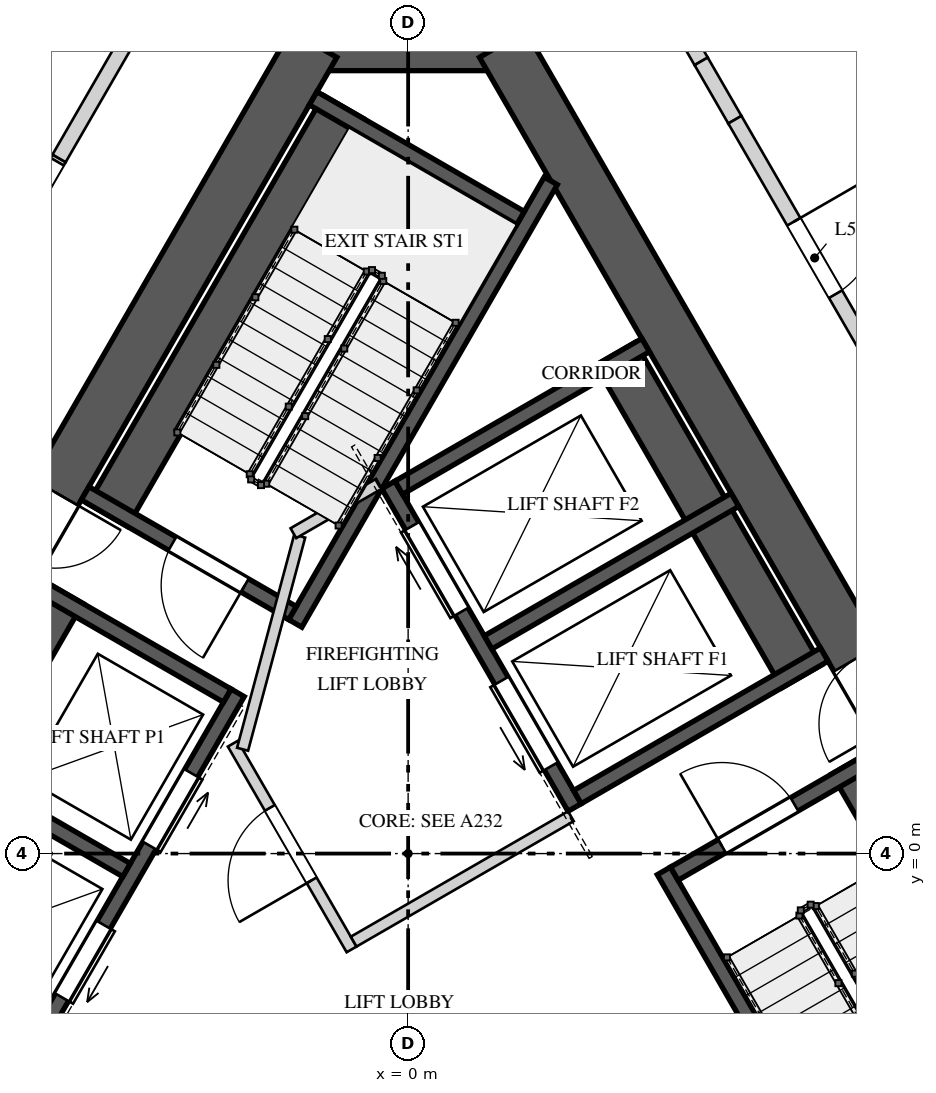
"""IFC4 building model, lengths in metres.
Left out: names, types, materials, properties, quantities, classifications, styles, units other than length and angle.
Written with IfcOpenShell. Run it as: python <this file> out.ifc"""

import sys

from ifc_helpers import new_model, si_unit, direction, frame, frame_2d, origin, place, context, subcontext, project, spatial, polyline, rectangle, outline, extrude, element, fill, save


model = new_model("IFC4")
c1 = context("Model", 3, precision=1e-05, world=origin(), true_north=direction((0.0, 1.0)))
c2 = subcontext(c1, "Body", "Model", "MODEL_VIEW")
j1 = project(units=[si_unit("LENGTHUNIT", "METRE"), si_unit("PLANEANGLEUNIT", "RADIAN")], contexts=[c1])
p1 = place(None, origin())
s1 = spatial("IfcSite", under=j1, at=p1, CompositionType="ELEMENT")
p2 = place(p1, origin())
s2 = spatial("IfcBuilding", under=s1, at=p2, CompositionType="ELEMENT")
p3 = place(p2, frame((0.0, 0.0, 237.2)))
s3 = spatial("IfcBuildingStorey", under=s2, at=p3, CompositionType="ELEMENT", Elevation=237.2)
p4 = place(p3, frame((1.443, 10.65, 0.0), z_axis=(0.0, 0.0, 1.0), x_axis=(-1.0, 0.0, 0.0)))
e1 = element("IfcWall", 1, at=p4, inside=s3, PredefinedType="SHEAR", context=c2, shape_type="SweptSolid", body=[
    extrude(rectangle(XDim=2.887, YDim=0.7, at=frame_2d((1.443, 0.0))), origin(), (0.0, 0.0, 1.0), 4.0),
])
p5 = place(p3, frame((-1.241, 10.65, 0.0), z_axis=(0.0, 0.0, 1.0), x_axis=(-0.500003331888, -0.866023480109, 0.0)))
e2 = element("IfcWall", 2, at=p5, inside=s3, PredefinedType="SHEAR", context=c2, shape_type="SweptSolid", body=[
    extrude(rectangle(XDim=17.205, YDim=0.7, at=frame_2d((8.603, 0.0))), origin(), (0.0, 0.0, 1.0), 4.0),
])
p6 = place(p5, frame((6.808, 0.0, 0.0)))
e3 = element("IfcOpeningElement", 3, at=p6, cuts=e2, PredefinedType="OPENING", context=c2, shape_type="SweptSolid", body=[
    extrude(rectangle(XDim=1.0, YDim=2.4, at=frame_2d((0.5, 1.2))), frame((0.0, 0.36, 0.0), z_axis=(0.0, -1.0, 0.0), x_axis=(1.0, 0.0, 0.0)), (0.0, 0.0, 1.0), 0.72),
])
p7 = place(p5, frame((14.922, 0.0, 0.0)))
e4 = element("IfcOpeningElement", 4, at=p7, cuts=e2, PredefinedType="OPENING", context=c2, shape_type="SweptSolid", body=[
    extrude(rectangle(XDim=0.8, YDim=2.1, at=frame_2d((0.4, 1.05))), frame((0.0, 0.36, 0.0), z_axis=(0.0, -1.0, 0.0), x_axis=(1.0, 0.0, 0.0)), (0.0, 0.0, 1.0), 0.72),
])
p8 = place(p3, frame((9.844, -4.25, 0.0), z_axis=(0.0, 0.0, 1.0), x_axis=(-0.500003331888, 0.866023480109, 0.0)))
e5 = element("IfcWall", 5, at=p8, inside=s3, PredefinedType="SHEAR", context=c2, shape_type="SweptSolid", body=[
    extrude(rectangle(XDim=17.205, YDim=0.7, at=frame_2d((8.603, 0.0))), origin(), (0.0, 0.0, 1.0), 4.0),
])
p9 = place(p8, frame((6.877, 0.0, 0.0)))
e6 = element("IfcOpeningElement", 6, at=p9, cuts=e5, PredefinedType="OPENING", context=c2, shape_type="SweptSolid", body=[
    extrude(rectangle(XDim=1.0, YDim=2.4, at=frame_2d((0.5, 1.2))), frame((0.0, 0.36, 0.0), z_axis=(0.0, -1.0, 0.0), x_axis=(1.0, 0.0, 0.0)), (0.0, 0.0, 1.0), 0.72),
])
p10 = place(p3, frame((-0.853, 9.823, 0.0), z_axis=(0.0, 0.0, 1.0), x_axis=(-0.500009909098, -0.866019682689, 0.0)))
e7 = element("IfcWall", 7, at=p10, inside=s3, PredefinedType="SOLIDWALL", context=c2, shape_type="SweptSolid", body=[
    extrude(rectangle(XDim=6.2, YDim=0.6, at=frame_2d((3.1, 0.0))), origin(), (0.0, 0.0, 1.0), 3.65),
])
p11 = place(p3, frame((1.876, 8.85, 0.0), z_axis=(0.0, 0.0, 1.0), x_axis=(-0.499998042495, -0.866026533947, 0.0)))
e8 = element("IfcWall", 8, at=p11, inside=s3, PredefinedType="SOLIDWALL", context=c2, shape_type="SweptSolid", body=[
    extrude(rectangle(XDim=6.723, YDim=0.2, at=frame_2d((3.361, 0.0))), origin(), (0.0, 0.0, 1.0), 3.65),
])
p12 = place(p3, frame((1.479, 8.361, 0.0), z_axis=(0.0, 0.0, 1.0), x_axis=(-0.866035871367, 0.499981869177, 0.0)))
e9 = element("IfcWall", 9, at=p12, inside=s3, PredefinedType="SOLIDWALL", context=c2, shape_type="SweptSolid", body=[
    extrude(rectangle(XDim=3.15, YDim=0.2, at=frame_2d((1.575, 0.0))), origin(), (0.0, 0.0, 1.0), 3.65),
])
p13 = place(p3, frame((-1.521, 3.165, 0.0), z_axis=(0.0, 0.0, 1.0), x_axis=(-0.866035871367, 0.499981869177, 0.0)))
e10 = element("IfcWall", 10, at=p13, inside=s3, PredefinedType="SOLIDWALL", context=c2, shape_type="SweptSolid", body=[
    extrude(rectangle(XDim=3.15, YDim=0.2, at=frame_2d((1.575, 0.0))), origin(), (0.0, 0.0, 1.0), 3.65),
])
p14 = place(p13, frame((0.725, 0.0, 0.0)))
e11 = element("IfcOpeningElement", 11, at=p14, cuts=e10, PredefinedType="OPENING", context=c2, shape_type="SweptSolid", body=[
    extrude(rectangle(XDim=1.1, YDim=2.4, at=frame_2d((0.55, 1.2))), frame((0.0, 0.11, 0.0), z_axis=(0.0, -1.0, 0.0), x_axis=(1.0, 0.0, 0.0)), (0.0, 0.0, 1.0), 0.22),
])
p15 = place(p3, frame((8.933, -4.172, 0.0), z_axis=(0.0, 0.0, 1.0), x_axis=(-0.500026960575, 0.86600983753, 0.0)))
e12 = element("IfcWall", 12, at=p15, inside=s3, PredefinedType="SOLIDWALL", context=c2, shape_type="SweptSolid", body=[
    extrude(rectangle(XDim=6.2, YDim=0.6, at=frame_2d((3.1, 0.0))), origin(), (0.0, 0.0, 1.0), 3.65),
])
p16 = place(p3, frame((6.726, -6.05, 0.0), z_axis=(0.0, 0.0, 1.0), x_axis=(-0.499970804718, 0.866042259032, 0.0)))
e13 = element("IfcWall", 13, at=p16, inside=s3, PredefinedType="SOLIDWALL", context=c2, shape_type="SweptSolid", body=[
    extrude(rectangle(XDim=6.723, YDim=0.2, at=frame_2d((3.361, 0.0))), origin(), (0.0, 0.0, 1.0), 3.65),
])
p17 = place(p3, frame((3.501, -0.265, 0.0), z_axis=(0.0, 0.0, 1.0), x_axis=(0.866035871367, 0.499981869177, 0.0)))
e14 = element("IfcWall", 14, at=p17, inside=s3, PredefinedType="SOLIDWALL", context=c2, shape_type="SweptSolid", body=[
    extrude(rectangle(XDim=3.15, YDim=0.2, at=frame_2d((1.575, 0.0))), origin(), (0.0, 0.0, 1.0), 3.65),
])
p18 = place(p17, frame((0.725, 0.0, 0.0)))
e15 = element("IfcOpeningElement", 15, at=p18, cuts=e14, PredefinedType="OPENING", context=c2, shape_type="SweptSolid", body=[
    extrude(rectangle(XDim=1.1, YDim=2.4, at=frame_2d((0.55, 1.2))), frame((0.0, 0.11, 0.0), z_axis=(0.0, -1.0, 0.0), x_axis=(1.0, 0.0, 0.0)), (0.0, 0.0, 1.0), 0.22),
])
p19 = place(p3, frame((-2.243, 2.115, 0.0), z_axis=(0.0, 0.0, 1.0), x_axis=(-0.499996545922, -0.866027397988, 0.0)))
e16 = element("IfcWall", 16, at=p19, inside=s3, PredefinedType="SOLIDWALL", context=c2, shape_type="SweptSolid", body=[
    extrude(rectangle(XDim=5.5, YDim=0.2, at=frame_2d((2.75, 0.0))), origin(), (0.0, 0.0, 1.0), 3.65),
])
p20 = place(p19, frame((1.22, 0.0, 0.0)))
e17 = element("IfcOpeningElement", 17, at=p20, cuts=e16, PredefinedType="OPENING", context=c2, shape_type="SweptSolid", body=[
    extrude(rectangle(XDim=1.1, YDim=2.1, at=frame_2d((0.55, 1.05))), frame((0.0, 0.11, 0.0), z_axis=(0.0, -1.0, 0.0), x_axis=(1.0, 0.0, 0.0)), (0.0, 0.0, 1.0), 0.22),
])
p21 = place(p19, frame((3.525, 0.0, 0.0)))
e18 = element("IfcOpeningElement", 18, at=p21, cuts=e16, PredefinedType="OPENING", context=c2, shape_type="SweptSolid", body=[
    extrude(rectangle(XDim=1.1, YDim=2.1, at=frame_2d((0.55, 1.05))), frame((0.0, 0.11, 0.0), z_axis=(0.0, -1.0, 0.0), x_axis=(1.0, 0.0, 0.0)), (0.0, 0.0, 1.0), 0.22),
])
p22 = place(p3, frame((-4.538, 3.44, 0.0), z_axis=(0.0, 0.0, 1.0), x_axis=(-0.499996545922, -0.866027397988, 0.0)))
e19 = element("IfcWall", 19, at=p22, inside=s3, PredefinedType="SOLIDWALL", context=c2, shape_type="SweptSolid", body=[
    extrude(rectangle(XDim=5.5, YDim=0.6, at=frame_2d((2.75, 0.0))), origin(), (0.0, 0.0, 1.0), 3.65),
])
p23 = place(p3, frame((-2.38, 2.078, 0.0), z_axis=(0.0, 0.0, 1.0), x_axis=(-0.866060182126, 0.499939757307, 0.0)))
e20 = element("IfcWall", 20, at=p23, inside=s3, PredefinedType="SOLIDWALL", context=c2, shape_type="SweptSolid", body=[
    extrude(rectangle(XDim=2.95, YDim=0.2, at=frame_2d((1.475, 0.0))), origin(), (0.0, 0.0, 1.0), 3.65),
])
p24 = place(p3, frame((-3.705, -0.217, 0.0), z_axis=(0.0, 0.0, 1.0), x_axis=(-0.866016039709, 0.500016218704, 0.0)))
e21 = element("IfcWall", 21, at=p24, inside=s3, PredefinedType="SOLIDWALL", context=c2, shape_type="SweptSolid", body=[
    extrude(rectangle(XDim=2.35, YDim=0.2, at=frame_2d((1.175, 0.0))), origin(), (0.0, 0.0, 1.0), 3.65),
])
p25 = place(p3, frame((2.19, 0.606, 0.0), z_axis=(0.0, 0.0, 1.0), x_axis=(-0.500002801628, 0.866023786258, 0.0)))
e22 = element("IfcWall", 22, at=p25, inside=s3, PredefinedType="SOLIDWALL", context=c2, shape_type="SweptSolid", body=[
    extrude(rectangle(XDim=4.9, YDim=0.2, at=frame_2d((2.45, 0.0))), origin(), (0.0, 0.0, 1.0), 3.65),
])
p26 = place(p25, frame((0.625, 0.0, 0.0)))
e23 = element("IfcOpeningElement", 23, at=p26, cuts=e22, PredefinedType="OPENING", context=c2, shape_type="SweptSolid", body=[
    extrude(rectangle(XDim=1.3, YDim=2.1, at=frame_2d((0.65, 1.05))), frame((0.0, 0.11, 0.0), z_axis=(0.0, -1.0, 0.0), x_axis=(1.0, 0.0, 0.0)), (0.0, 0.0, 1.0), 0.22),
])
p27 = place(p25, frame((2.975, 0.0, 0.0)))
e24 = element("IfcOpeningElement", 24, at=p27, cuts=e22, PredefinedType="OPENING", context=c2, shape_type="SweptSolid", body=[
    extrude(rectangle(XDim=1.3, YDim=2.1, at=frame_2d((0.65, 1.05))), frame((0.0, 0.11, 0.0), z_axis=(0.0, -1.0, 0.0), x_axis=(1.0, 0.0, 0.0)), (0.0, 0.0, 1.0), 0.22),
])
p28 = place(p3, frame((5.178, 2.331, 0.0), z_axis=(0.0, 0.0, 1.0), x_axis=(-0.49998122708, 0.866036242063, 0.0)))
e25 = element("IfcWall", 25, at=p28, inside=s3, PredefinedType="SOLIDWALL", context=c2, shape_type="SweptSolid", body=[
    extrude(rectangle(XDim=4.9, YDim=0.6, at=frame_2d((2.45, 0.0))), origin(), (0.0, 0.0, 1.0), 3.65),
])
p29 = place(p3, frame((2.227, 0.743, 0.0), z_axis=(0.0, 0.0, 1.0), x_axis=(0.866022959057, 0.500004234368, 0.0)))
e26 = element("IfcWall", 26, at=p29, inside=s3, PredefinedType="SOLIDWALL", context=c2, shape_type="SweptSolid", body=[
    extrude(rectangle(XDim=3.75, YDim=0.2, at=frame_2d((1.875, 0.0))), origin(), (0.0, 0.0, 1.0), 3.65),
])
p30 = place(p3, frame((1.052, 2.778, 0.0), z_axis=(0.0, 0.0, 1.0), x_axis=(0.866039234136, 0.499976044363, 0.0)))
e27 = element("IfcWall", 27, at=p30, inside=s3, PredefinedType="SOLIDWALL", context=c2, shape_type="SweptSolid", body=[
    extrude(rectangle(XDim=3.75, YDim=0.2, at=frame_2d((1.875, 0.0))), origin(), (0.0, 0.0, 1.0), 3.65),
])
p31 = place(p3, frame((-0.123, 4.813, 0.0), z_axis=(0.0, 0.0, 1.0), x_axis=(0.866022959057, 0.500004234368, 0.0)))
e28 = element("IfcWall", 28, at=p31, inside=s3, PredefinedType="SOLIDWALL", context=c2, shape_type="SweptSolid", body=[
    extrude(rectangle(XDim=3.75, YDim=0.2, at=frame_2d((1.875, 0.0))), origin(), (0.0, 0.0, 1.0), 3.65),
])
p32 = place(p3, frame((-0.744, -1.261, 0.0), z_axis=(0.0, 0.0, 1.0), x_axis=(-0.500004234368, 0.866022959057, 0.0)))
e29 = element("IfcWall", 29, at=p32, inside=s3, PredefinedType="PARTITIONING", context=c2, shape_type="SweptSolid", body=[
    extrude(rectangle(XDim=3.125, YDim=0.15, at=frame_2d((1.562, 0.0))), origin(), (0.0, 0.0, 1.0), 3.65),
])
p33 = place(p32, frame((1.05, 0.0, 0.0)))
e30 = element("IfcOpeningElement", 30, at=p33, cuts=e29, PredefinedType="OPENING", context=c2, shape_type="SweptSolid", body=[
    extrude(rectangle(XDim=1.1, YDim=2.4, at=frame_2d((0.55, 1.2))), frame((0.0, 0.085, 0.0), z_axis=(0.0, -1.0, 0.0), x_axis=(1.0, 0.0, 0.0)), (0.0, 0.0, 1.0), 0.17),
])
p34 = place(p3, frame((-0.717, -1.159, 0.0), z_axis=(0.0, 0.0, 1.0), x_axis=(0.866008176907, 0.50002983664, 0.0)))
e31 = element("IfcWall", 31, at=p34, inside=s3, PredefinedType="PARTITIONING", context=c2, shape_type="SweptSolid", body=[
    extrude(rectangle(XDim=3.3, YDim=0.15, at=frame_2d((1.65, 0.0))), origin(), (0.0, 0.0, 1.0), 3.65),
])
p35 = place(p3, frame((-2.178, 1.372, 0.0), z_axis=(0.0, 0.0, 1.0), x_axis=(0.258808958833, 0.96592852884, 0.0)))
e32 = element("IfcWall", 32, at=p35, inside=s3, PredefinedType="PARTITIONING", context=c2, shape_type="SweptSolid", body=[
    extrude(rectangle(XDim=2.903, YDim=0.15, at=frame_2d((1.451, 0.0))), origin(), (0.0, 0.0, 1.0), 3.65),
])
p36 = place(p3, frame((-1.51, 4.215, 0.0), z_axis=(0.0, 0.0, 1.0), x_axis=(0.866085525409, 0.49989585183, 0.0)))
e33 = element("IfcWall", 33, at=p36, inside=s3, PredefinedType="PARTITIONING", context=c2, shape_type="SweptSolid", body=[
    extrude(rectangle(XDim=1.3, YDim=0.15, at=frame_2d((0.65, 0.0))), origin(), (0.0, 0.0, 1.0), 3.65),
])
p37 = place(p3, frame((-5.622, 7.362, 0.0), z_axis=(0.0, 0.0, 1.0), x_axis=(0.50006436408, 0.865988239976, 0.0)))
e34 = element("IfcWall", 34, at=p37, inside=s3, PredefinedType="SOLIDWALL", context=c2, shape_type="SweptSolid", body=[
    extrude(outline(polyline([(0.0, 0.0), (2.06, 0.0), (2.06, 3.65), (0.884, 3.65), (0.884, 2.75), (0.0, 2.75), (0.0, 0.0)])), frame((0.0, 0.1, 0.0), z_axis=(0.0, -1.0, 0.0), x_axis=(1.0, 0.0, 0.0)), (0.0, 0.0, 1.0), 0.2),
])
p38 = place(p37, frame((0.91, 0.0, 0.0)))
e35 = element("IfcOpeningElement", 35, at=p38, cuts=e34, PredefinedType="OPENING", context=c2, shape_type="SweptSolid", body=[
    extrude(rectangle(XDim=1.1, YDim=2.4, at=frame_2d((0.55, 1.2))), frame((0.0, 0.11, 0.0), z_axis=(0.0, -1.0, 0.0), x_axis=(1.0, 0.0, 0.0)), (0.0, 0.0, 1.0), 0.22),
])
p39 = place(p3, frame((-4.592, 9.146, 0.0), z_axis=(0.0, 0.0, 1.0), x_axis=(0.499987651691, 0.866032532966, 0.0)))
e36 = element("IfcWall", 36, at=p39, inside=s3, PredefinedType="SOLIDWALL", context=c2, shape_type="SweptSolid", body=[
    extrude(rectangle(XDim=3.984, YDim=0.2, at=frame_2d((1.992, 0.0))), origin(), (0.0, 0.0, 1.0), 3.65),
])
p40 = place(p3, frame((2.483, 12.8, 0.0), z_axis=(0.0, 0.0, 1.0), x_axis=(0.499956000529, -0.8660508054, 0.0)))
e37 = element("IfcWall", 37, at=p40, inside=s3, PredefinedType="SOLIDWALL", context=c2, shape_type="SweptSolid", body=[
    extrude(rectangle(XDim=2.745, YDim=0.2, at=frame_2d((1.373, 0.0))), origin(), (0.0, 0.0, 1.0), 3.65),
])
p41 = place(p3, frame((3.855, 10.423, 0.0), z_axis=(0.0, 0.0, 1.0), x_axis=(0.500135429527, -0.86594719939, 0.0)))
e38 = element("IfcWall", 38, at=p41, inside=s3, PredefinedType="SOLIDWALL", context=c2, shape_type="SweptSolid", body=[
    extrude(rectangle(XDim=0.887, YDim=0.2, at=frame_2d((0.443, 0.0))), origin(), (0.0, 0.0, 1.0), 2.95),
])
p42 = place(p3, frame((4.299, 9.655, 0.0), z_axis=(0.0, 0.0, 1.0), x_axis=(0.499997905474, -0.866026613056, 0.0)))
e39 = element("IfcWall", 39, at=p42, inside=s3, PredefinedType="SOLIDWALL", context=c2, shape_type="SweptSolid", body=[
    extrude(rectangle(XDim=3.811, YDim=0.2, at=frame_2d((1.905, 0.0))), origin(), (0.0, 0.0, 1.0), 3.65),
])
p43 = place(p42, frame((1.55, 0.0, 0.0)))
e40 = element("IfcOpeningElement", 40, at=p43, cuts=e39, PredefinedType="OPENING", context=c2, shape_type="SweptSolid", body=[
    extrude(rectangle(XDim=1.1, YDim=2.4, at=frame_2d((0.55, 1.2))), frame((0.0, 0.11, 0.0), z_axis=(0.0, -1.0, 0.0), x_axis=(1.0, 0.0, 0.0)), (0.0, 0.0, 1.0), 0.22),
])
p44 = place(p14, origin())
e41 = element("IfcDoor", 41, at=p44, inside=s3, OperationType="SINGLE_SWING_RIGHT", PredefinedType="DOOR", context=c2, shape_type="SweptSolid", body=[
    extrude(rectangle(XDim=1.1, YDim=2.4, at=frame_2d((0.55, 1.2))), frame((0.0, 0.025, 0.0), z_axis=(0.0, -1.0, 0.0), x_axis=(1.0, 0.0, 0.0)), (0.0, 0.0, 1.0), 0.05),
])
fill(e11, e41)
p45 = place(p18, origin())
e42 = element("IfcDoor", 42, at=p45, inside=s3, OperationType="SINGLE_SWING_RIGHT", PredefinedType="DOOR", context=c2, shape_type="SweptSolid", body=[
    extrude(rectangle(XDim=1.1, YDim=2.4, at=frame_2d((0.55, 1.2))), frame((0.0, 0.025, 0.0), z_axis=(0.0, -1.0, 0.0), x_axis=(1.0, 0.0, 0.0)), (0.0, 0.0, 1.0), 0.05),
])
fill(e15, e42)
p46 = place(p20, origin())
e43 = element("IfcDoor", 43, at=p46, inside=s3, OperationType="SLIDING_TO_LEFT", PredefinedType="DOOR", context=c2, shape_type="SweptSolid", body=[
    extrude(rectangle(XDim=1.1, YDim=2.1, at=frame_2d((0.55, 1.05))), frame((0.0, 0.025, 0.0), z_axis=(0.0, -1.0, 0.0), x_axis=(1.0, 0.0, 0.0)), (0.0, 0.0, 1.0), 0.05),
])
fill(e17, e43)
p47 = place(p21, origin())
e44 = element("IfcDoor", 44, at=p47, inside=s3, OperationType="SLIDING_TO_RIGHT", PredefinedType="DOOR", context=c2, shape_type="SweptSolid", body=[
    extrude(rectangle(XDim=1.1, YDim=2.1, at=frame_2d((0.55, 1.05))), frame((0.0, 0.025, 0.0), z_axis=(0.0, -1.0, 0.0), x_axis=(1.0, 0.0, 0.0)), (0.0, 0.0, 1.0), 0.05),
])
fill(e18, e44)
p48 = place(p26, origin())
e45 = element("IfcDoor", 45, at=p48, inside=s3, OperationType="SLIDING_TO_LEFT", PredefinedType="DOOR", context=c2, shape_type="SweptSolid", body=[
    extrude(rectangle(XDim=1.3, YDim=2.1, at=frame_2d((0.65, 1.05))), frame((0.0, 0.025, 0.0), z_axis=(0.0, -1.0, 0.0), x_axis=(1.0, 0.0, 0.0)), (0.0, 0.0, 1.0), 0.05),
])
fill(e23, e45)
p49 = place(p27, origin())
e46 = element("IfcDoor", 46, at=p49, inside=s3, OperationType="SLIDING_TO_RIGHT", PredefinedType="DOOR", context=c2, shape_type="SweptSolid", body=[
    extrude(rectangle(XDim=1.3, YDim=2.1, at=frame_2d((0.65, 1.05))), frame((0.0, 0.025, 0.0), z_axis=(0.0, -1.0, 0.0), x_axis=(1.0, 0.0, 0.0)), (0.0, 0.0, 1.0), 0.05),
])
fill(e24, e46)
p50 = place(p33, origin())
e47 = element("IfcDoor", 47, at=p50, inside=s3, OperationType="SINGLE_SWING_LEFT", PredefinedType="DOOR", context=c2, shape_type="SweptSolid", body=[
    extrude(rectangle(XDim=1.1, YDim=2.4, at=frame_2d((0.55, 1.2))), frame((0.0, 0.025, 0.0), z_axis=(0.0, -1.0, 0.0), x_axis=(1.0, 0.0, 0.0)), (0.0, 0.0, 1.0), 0.05),
])
fill(e30, e47)
p51 = place(p6, origin())
e48 = element("IfcDoor", 48, at=p51, inside=s3, OperationType="SINGLE_SWING_RIGHT", PredefinedType="DOOR", context=c2, shape_type="SweptSolid", body=[
    extrude(rectangle(XDim=1.0, YDim=2.4, at=frame_2d((0.5, 1.2))), frame((0.0, 0.025, 0.0), z_axis=(0.0, -1.0, 0.0), x_axis=(1.0, 0.0, 0.0)), (0.0, 0.0, 1.0), 0.05),
])
fill(e3, e48)
p52 = place(p9, origin())
e49 = element("IfcDoor", 49, at=p52, inside=s3, OperationType="SINGLE_SWING_RIGHT", PredefinedType="DOOR", context=c2, shape_type="SweptSolid", body=[
    extrude(rectangle(XDim=1.0, YDim=2.4, at=frame_2d((0.5, 1.2))), frame((0.0, 0.025, 0.0), z_axis=(0.0, -1.0, 0.0), x_axis=(1.0, 0.0, 0.0)), (0.0, 0.0, 1.0), 0.05),
])
fill(e6, e49)
p53 = place(p43, origin())
e50 = element("IfcDoor", 50, at=p53, inside=s3, OperationType="SINGLE_SWING_LEFT", PredefinedType="DOOR", context=c2, shape_type="SweptSolid", body=[
    extrude(rectangle(XDim=1.1, YDim=2.4, at=frame_2d((0.55, 1.2))), frame((0.0, 0.025, 0.0), z_axis=(0.0, -1.0, 0.0), x_axis=(1.0, 0.0, 0.0)), (0.0, 0.0, 1.0), 0.05),
])
fill(e40, e50)
p54 = place(p38, origin())
e51 = element("IfcDoor", 51, at=p54, inside=s3, OperationType="SINGLE_SWING_RIGHT", PredefinedType="DOOR", context=c2, shape_type="SweptSolid", body=[
    extrude(rectangle(XDim=1.1, YDim=2.4, at=frame_2d((0.55, 1.2))), frame((0.0, 0.025, 0.0), z_axis=(0.0, -1.0, 0.0), x_axis=(1.0, 0.0, 0.0)), (0.0, 0.0, 1.0), 0.05),
])
fill(e35, e51)
save(model, sys.argv[1])
